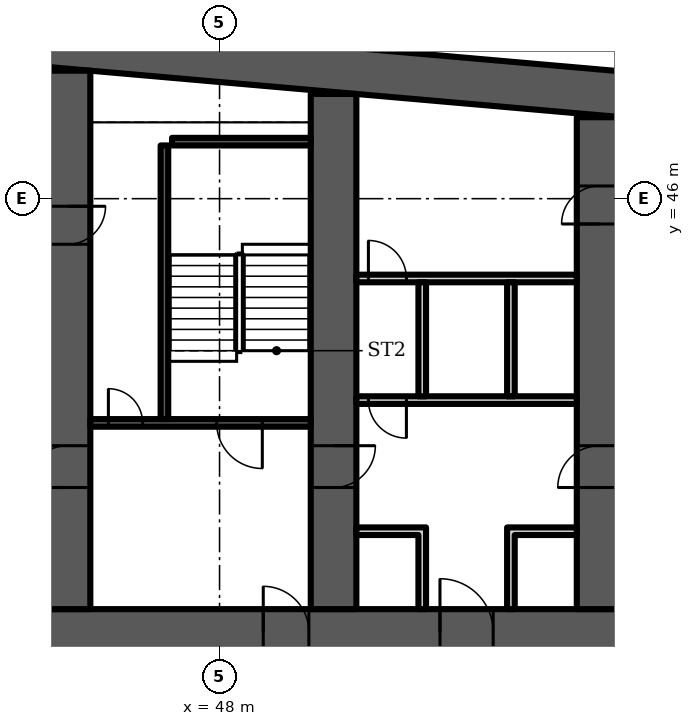
"""IFC4 building model, lengths in metres.
Left out: names, types, materials, properties, quantities, classifications, styles, units other than length and angle.
Written with IfcOpenShell. Run it as: python <this file> out.ifc"""

import sys

from ifc_helpers import new_model, si_unit, direction, frame, frame_2d, origin, place, context, subcontext, project, spatial, polyline, rectangle, outline, extrude, element, fill, save


model = new_model("IFC4")
c1 = context("Model", 3, precision=1e-05, world=origin(), true_north=direction((0.0, 1.0)))
c2 = subcontext(c1, "Body", "Model", "MODEL_VIEW")
j1 = project(units=[si_unit("LENGTHUNIT", "METRE"), si_unit("PLANEANGLEUNIT", "RADIAN")], contexts=[c1])
p1 = place(None, origin())
s1 = spatial("IfcSite", under=j1, at=p1, CompositionType="ELEMENT")
p2 = place(p1, origin())
s2 = spatial("IfcBuilding", under=s1, at=p2, CompositionType="ELEMENT")
p3 = place(p2, frame((0.0, 0.0, 66.7)))
s3 = spatial("IfcBuildingStorey", under=s2, at=p3, CompositionType="ELEMENT", Elevation=66.7)
p4 = place(p3, origin())
e1 = element("IfcWall", 1, at=p4, inside=s3, PredefinedType="SHEAR", context=c2, shape_type="SweptSolid", body=[
    extrude(outline(polyline([(9.0, 47.583), (37.0, 50.032), (65.0, 47.583), (65.0, 48.787), (37.0, 51.237), (9.0, 48.787), (9.0, 47.583)])), origin(), (0.0, 0.0, 1.0), 3.6),
])
p5 = place(p3, frame((9.0, 34.6, 0.0), z_axis=(0.0, 0.0, 1.0), x_axis=(1.0, 0.0, 0.0)))
e2 = element("IfcWall", 2, at=p5, inside=s3, PredefinedType="SHEAR", context=c2, shape_type="SweptSolid", body=[
    extrude(rectangle(XDim=56.0, YDim=1.2, at=frame_2d((28.0, 0.0))), origin(), (0.0, 0.0, 1.0), 3.6),
])
p6 = place(p5, frame((2.0, 0.0, 0.0)))
e3 = element("IfcOpeningElement", 3, at=p6, cuts=e2, PredefinedType="OPENING", context=c2, shape_type="SweptSolid", body=[
    extrude(rectangle(XDim=1.0, YDim=2.1, at=frame_2d((0.5, 1.05))), frame((0.0, 0.61, 0.0), z_axis=(0.0, -1.0, 0.0), x_axis=(1.0, 0.0, 0.0)), (0.0, 0.0, 1.0), 1.22),
])
p7 = place(p5, frame((4.6, 0.0, 0.0)))
e4 = element("IfcOpeningElement", 4, at=p7, cuts=e2, PredefinedType="OPENING", context=c2, shape_type="SweptSolid", body=[
    extrude(rectangle(XDim=1.0, YDim=2.1, at=frame_2d((0.5, 1.05))), frame((0.0, 0.61, 0.0), z_axis=(0.0, -1.0, 0.0), x_axis=(1.0, 0.0, 0.0)), (0.0, 0.0, 1.0), 1.22),
])
p8 = place(p5, frame((7.867, 0.0, 0.0)))
e5 = element("IfcOpeningElement", 5, at=p8, cuts=e2, PredefinedType="OPENING", context=c2, shape_type="SweptSolid", body=[
    extrude(rectangle(XDim=1.1, YDim=2.1, at=frame_2d((0.55, 1.05))), frame((0.0, 0.61, 0.0), z_axis=(0.0, -1.0, 0.0), x_axis=(1.0, 0.0, 0.0)), (0.0, 0.0, 1.0), 1.22),
])
p9 = place(p5, frame((12.033, 0.0, 0.0)))
e6 = element("IfcOpeningElement", 6, at=p9, cuts=e2, PredefinedType="OPENING", context=c2, shape_type="SweptSolid", body=[
    extrude(rectangle(XDim=1.1, YDim=2.1, at=frame_2d((0.55, 1.05))), frame((0.0, 0.61, 0.0), z_axis=(0.0, -1.0, 0.0), x_axis=(1.0, 0.0, 0.0)), (0.0, 0.0, 1.0), 1.22),
])
p10 = place(p5, frame((9.8, 0.0, 0.0)))
e7 = element("IfcOpeningElement", 7, at=p10, cuts=e2, PredefinedType="OPENING", context=c2, shape_type="SweptSolid", body=[
    extrude(rectangle(XDim=1.4, YDim=2.1, at=frame_2d((0.7, 1.05))), frame((0.0, 0.61, 0.0), z_axis=(0.0, -1.0, 0.0), x_axis=(1.0, 0.0, 0.0)), (0.0, 0.0, 1.0), 1.22),
])
p11 = place(p5, frame((14.65, 0.0, 0.0)))
e8 = element("IfcOpeningElement", 8, at=p11, cuts=e2, PredefinedType="OPENING", context=c2, shape_type="SweptSolid", body=[
    extrude(rectangle(XDim=1.2, YDim=2.1, at=frame_2d((0.6, 1.05))), frame((0.0, 0.61, 0.0), z_axis=(0.0, -1.0, 0.0), x_axis=(1.0, 0.0, 0.0)), (0.0, 0.0, 1.0), 1.22),
])
p12 = place(p5, frame((21.867, 0.0, 0.0)))
e9 = element("IfcOpeningElement", 9, at=p12, cuts=e2, PredefinedType="OPENING", context=c2, shape_type="SweptSolid", body=[
    extrude(rectangle(XDim=1.1, YDim=2.1, at=frame_2d((0.55, 1.05))), frame((0.0, 0.61, 0.0), z_axis=(0.0, -1.0, 0.0), x_axis=(1.0, 0.0, 0.0)), (0.0, 0.0, 1.0), 1.22),
])
p13 = place(p5, frame((26.033, 0.0, 0.0)))
e10 = element("IfcOpeningElement", 10, at=p13, cuts=e2, PredefinedType="OPENING", context=c2, shape_type="SweptSolid", body=[
    extrude(rectangle(XDim=1.1, YDim=2.1, at=frame_2d((0.55, 1.05))), frame((0.0, 0.61, 0.0), z_axis=(0.0, -1.0, 0.0), x_axis=(1.0, 0.0, 0.0)), (0.0, 0.0, 1.0), 1.22),
])
p14 = place(p5, frame((23.8, 0.0, 0.0)))
e11 = element("IfcOpeningElement", 11, at=p14, cuts=e2, PredefinedType="OPENING", context=c2, shape_type="SweptSolid", body=[
    extrude(rectangle(XDim=1.4, YDim=2.1, at=frame_2d((0.7, 1.05))), frame((0.0, 0.61, 0.0), z_axis=(0.0, -1.0, 0.0), x_axis=(1.0, 0.0, 0.0)), (0.0, 0.0, 1.0), 1.22),
])
p15 = place(p5, frame((28.867, 0.0, 0.0)))
e12 = element("IfcOpeningElement", 12, at=p15, cuts=e2, PredefinedType="OPENING", context=c2, shape_type="SweptSolid", body=[
    extrude(rectangle(XDim=1.1, YDim=2.1, at=frame_2d((0.55, 1.05))), frame((0.0, 0.61, 0.0), z_axis=(0.0, -1.0, 0.0), x_axis=(1.0, 0.0, 0.0)), (0.0, 0.0, 1.0), 1.22),
])
p16 = place(p5, frame((33.033, 0.0, 0.0)))
e13 = element("IfcOpeningElement", 13, at=p16, cuts=e2, PredefinedType="OPENING", context=c2, shape_type="SweptSolid", body=[
    extrude(rectangle(XDim=1.1, YDim=2.1, at=frame_2d((0.55, 1.05))), frame((0.0, 0.61, 0.0), z_axis=(0.0, -1.0, 0.0), x_axis=(1.0, 0.0, 0.0)), (0.0, 0.0, 1.0), 1.22),
])
p17 = place(p5, frame((40.15, 0.0, 0.0)))
e14 = element("IfcOpeningElement", 14, at=p17, cuts=e2, PredefinedType="OPENING", context=c2, shape_type="SweptSolid", body=[
    extrude(rectangle(XDim=1.2, YDim=2.1, at=frame_2d((0.6, 1.05))), frame((0.0, 0.61, 0.0), z_axis=(0.0, -1.0, 0.0), x_axis=(1.0, 0.0, 0.0)), (0.0, 0.0, 1.0), 1.22),
])
p18 = place(p5, frame((44.8, 0.0, 0.0)))
e15 = element("IfcOpeningElement", 15, at=p18, cuts=e2, PredefinedType="OPENING", context=c2, shape_type="SweptSolid", body=[
    extrude(rectangle(XDim=1.4, YDim=2.1, at=frame_2d((0.7, 1.05))), frame((0.0, 0.61, 0.0), z_axis=(0.0, -1.0, 0.0), x_axis=(1.0, 0.0, 0.0)), (0.0, 0.0, 1.0), 1.22),
])
p19 = place(p5, frame((49.867, 0.0, 0.0)))
e16 = element("IfcOpeningElement", 16, at=p19, cuts=e2, PredefinedType="OPENING", context=c2, shape_type="SweptSolid", body=[
    extrude(rectangle(XDim=1.1, YDim=2.1, at=frame_2d((0.55, 1.05))), frame((0.0, 0.61, 0.0), z_axis=(0.0, -1.0, 0.0), x_axis=(1.0, 0.0, 0.0)), (0.0, 0.0, 1.0), 1.22),
])
p20 = place(p5, frame((53.5, 0.0, 0.0)))
e17 = element("IfcOpeningElement", 17, at=p20, cuts=e2, PredefinedType="OPENING", context=c2, shape_type="SweptSolid", body=[
    extrude(rectangle(XDim=1.1, YDim=2.1, at=frame_2d((0.55, 1.05))), frame((0.0, 0.61, 0.0), z_axis=(0.0, -1.0, 0.0), x_axis=(1.0, 0.0, 0.0)), (0.0, 0.0, 1.0), 1.22),
])
p21 = place(p5, frame((51.567, 0.0, 0.0)))
e18 = element("IfcOpeningElement", 18, at=p21, cuts=e2, PredefinedType="OPENING", context=c2, shape_type="SweptSolid", body=[
    extrude(rectangle(XDim=1.4, YDim=2.1, at=frame_2d((0.7, 1.05))), frame((0.0, 0.61, 0.0), z_axis=(0.0, -1.0, 0.0), x_axis=(1.0, 0.0, 0.0)), (0.0, 0.0, 1.0), 1.22),
])
p22 = place(p3, frame((44.0, 35.2, 0.0), z_axis=(0.0, 0.0, 1.0), x_axis=(0.0, 1.0, 0.0)))
e19 = element("IfcWall", 19, at=p22, inside=s3, PredefinedType="SHEAR", context=c2, shape_type="SweptSolid", body=[
    extrude(rectangle(XDim=14.168, YDim=1.2, at=frame_2d((7.084, 0.0))), origin(), (0.0, 0.0, 1.0), 3.6),
])
p23 = place(p22, frame((3.2, 0.0, 0.0)))
e20 = element("IfcOpeningElement", 20, at=p23, cuts=e19, PredefinedType="OPENING", context=c2, shape_type="SweptSolid", body=[
    extrude(rectangle(XDim=1.1, YDim=2.1, at=frame_2d((0.55, 1.05))), frame((0.0, 0.61, 0.0), z_axis=(0.0, -1.0, 0.0), x_axis=(1.0, 0.0, 0.0)), (0.0, 0.0, 1.0), 1.22),
])
p24 = place(p22, frame((9.6, 0.0, 0.0)))
e21 = element("IfcOpeningElement", 21, at=p24, cuts=e19, PredefinedType="OPENING", context=c2, shape_type="SweptSolid", body=[
    extrude(rectangle(XDim=1.0, YDim=2.1, at=frame_2d((0.5, 1.05))), frame((0.0, 0.61, 0.0), z_axis=(0.0, -1.0, 0.0), x_axis=(1.0, 0.0, 0.0)), (0.0, 0.0, 1.0), 1.22),
])
p25 = place(p3, frame((51.0, 35.2, 0.0), z_axis=(0.0, 0.0, 1.0), x_axis=(0.0, 1.0, 0.0)))
e22 = element("IfcWall", 22, at=p25, inside=s3, PredefinedType="SHEAR", context=c2, shape_type="SweptSolid", body=[
    extrude(rectangle(XDim=13.555, YDim=1.2, at=frame_2d((6.778, 0.0))), origin(), (0.0, 0.0, 1.0), 3.6),
])
p26 = place(p25, frame((3.2, 0.0, 0.0)))
e23 = element("IfcOpeningElement", 23, at=p26, cuts=e22, PredefinedType="OPENING", context=c2, shape_type="SweptSolid", body=[
    extrude(rectangle(XDim=1.1, YDim=2.1, at=frame_2d((0.55, 1.05))), frame((0.0, 0.61, 0.0), z_axis=(0.0, -1.0, 0.0), x_axis=(1.0, 0.0, 0.0)), (0.0, 0.0, 1.0), 1.22),
])
p27 = place(p3, frame((58.0, 35.2, 0.0), z_axis=(0.0, 0.0, 1.0), x_axis=(0.0, 1.0, 0.0)))
e24 = element("IfcWall", 24, at=p27, inside=s3, PredefinedType="SHEAR", context=c2, shape_type="SweptSolid", body=[
    extrude(rectangle(XDim=12.943, YDim=1.2, at=frame_2d((6.471, 0.0))), origin(), (0.0, 0.0, 1.0), 3.6),
])
p28 = place(p27, frame((10.134, 0.0, 0.0)))
e25 = element("IfcOpeningElement", 25, at=p28, cuts=e24, PredefinedType="OPENING", context=c2, shape_type="SweptSolid", body=[
    extrude(rectangle(XDim=1.0, YDim=2.1, at=frame_2d((0.5, 1.05))), frame((0.0, 0.61, 0.0), z_axis=(0.0, -1.0, 0.0), x_axis=(1.0, 0.0, 0.0)), (0.0, 0.0, 1.0), 1.22),
])
p29 = place(p27, frame((3.2, 0.0, 0.0)))
e26 = element("IfcOpeningElement", 26, at=p29, cuts=e24, PredefinedType="OPENING", context=c2, shape_type="SweptSolid", body=[
    extrude(rectangle(XDim=1.1, YDim=2.1, at=frame_2d((0.55, 1.05))), frame((0.0, 0.61, 0.0), z_axis=(0.0, -1.0, 0.0), x_axis=(1.0, 0.0, 0.0)), (0.0, 0.0, 1.0), 1.22),
])
p30 = place(p3, frame((44.6, 40.1, 0.0), z_axis=(0.0, 0.0, 1.0), x_axis=(1.0, 0.0, 0.0)))
e27 = element("IfcWall", 27, at=p30, inside=s3, PredefinedType="SHEAR", context=c2, shape_type="SweptSolid", body=[
    extrude(rectangle(XDim=5.8, YDim=0.2, at=frame_2d((2.9, 0.0))), origin(), (0.0, 0.0, 1.0), 3.2),
])
p31 = place(p30, frame((3.325, 0.0, 0.0)))
e28 = element("IfcOpeningElement", 28, at=p31, cuts=e27, PredefinedType="OPENING", context=c2, shape_type="SweptSolid", body=[
    extrude(rectangle(XDim=1.2, YDim=2.1, at=frame_2d((0.6, 1.05))), frame((0.0, 0.11, 0.0), z_axis=(0.0, -1.0, 0.0), x_axis=(1.0, 0.0, 0.0)), (0.0, 0.0, 1.0), 0.22),
])
p32 = place(p30, frame((0.475, 0.0, 0.0)))
e29 = element("IfcOpeningElement", 29, at=p32, cuts=e27, PredefinedType="OPENING", context=c2, shape_type="SweptSolid", body=[
    extrude(rectangle(XDim=0.9, YDim=2.1, at=frame_2d((0.45, 1.05))), frame((0.0, 0.11, 0.0), z_axis=(0.0, -1.0, 0.0), x_axis=(1.0, 0.0, 0.0)), (0.0, 0.0, 1.0), 0.22),
])
p33 = place(p3, frame((46.55, 40.2, 0.0), z_axis=(0.0, 0.0, 1.0), x_axis=(0.0, 1.0, 0.0)))
e30 = element("IfcWall", 30, at=p33, inside=s3, PredefinedType="SHEAR", context=c2, shape_type="SweptSolid", body=[
    extrude(rectangle(XDim=7.2, YDim=0.2, at=frame_2d((3.6, 0.0))), origin(), (0.0, 0.0, 1.0), 3.2),
])
p34 = place(p3, frame((46.75, 47.5, 0.0), z_axis=(0.0, 0.0, 1.0), x_axis=(1.0, 0.0, 0.0)))
e31 = element("IfcWall", 31, at=p34, inside=s3, PredefinedType="SHEAR", context=c2, shape_type="SweptSolid", body=[
    extrude(rectangle(XDim=3.65, YDim=0.2, at=frame_2d((1.825, 0.0))), origin(), (0.0, 0.0, 1.0), 3.2),
])
p35 = place(p3, frame((51.6, 40.7, 0.0), z_axis=(0.0, 0.0, 1.0), x_axis=(1.0, 0.0, 0.0)))
e32 = element("IfcWall", 32, at=p35, inside=s3, PredefinedType="PARTITIONING", context=c2, shape_type="SweptSolid", body=[
    extrude(rectangle(XDim=5.8, YDim=0.2, at=frame_2d((2.9, 0.0))), origin(), (0.0, 0.0, 1.0), 3.2),
])
p36 = place(p35, frame((0.317, 0.0, 0.0)))
e33 = element("IfcOpeningElement", 33, at=p36, cuts=e32, PredefinedType="OPENING", context=c2, shape_type="SweptSolid", body=[
    extrude(rectangle(XDim=1.0, YDim=2.1, at=frame_2d((0.5, 1.05))), frame((0.0, 0.11, 0.0), z_axis=(0.0, -1.0, 0.0), x_axis=(1.0, 0.0, 0.0)), (0.0, 0.0, 1.0), 0.22),
])
p37 = place(p3, frame((51.6, 43.9, 0.0), z_axis=(0.0, 0.0, 1.0), x_axis=(1.0, 0.0, 0.0)))
e34 = element("IfcWall", 34, at=p37, inside=s3, PredefinedType="PARTITIONING", context=c2, shape_type="SweptSolid", body=[
    extrude(rectangle(XDim=5.8, YDim=0.2, at=frame_2d((2.9, 0.0))), origin(), (0.0, 0.0, 1.0), 3.2),
])
p38 = place(p37, frame((0.317, 0.0, 0.0)))
e35 = element("IfcOpeningElement", 35, at=p38, cuts=e34, PredefinedType="OPENING", context=c2, shape_type="SweptSolid", body=[
    extrude(rectangle(XDim=1.0, YDim=2.1, at=frame_2d((0.5, 1.05))), frame((0.0, 0.11, 0.0), z_axis=(0.0, -1.0, 0.0), x_axis=(1.0, 0.0, 0.0)), (0.0, 0.0, 1.0), 0.22),
])
p39 = place(p3, frame((0.0, 0.0, -0.0)))
e36 = element("IfcWall", 36, at=p39, inside=s3, PredefinedType="PARTITIONING", context=c2, shape_type="SweptSolid", body=[
    extrude(outline(polyline([(53.233, 37.15), (51.6, 37.15), (51.6, 37.35), (53.233, 37.35), (53.433, 37.35), (53.433, 35.2), (53.233, 35.2), (53.233, 37.15)])), origin(), (0.0, 0.0, 1.0), 3.2),
])
p40 = place(p3, frame((0.0, 0.0, -0.0)))
e37 = element("IfcWall", 37, at=p40, inside=s3, PredefinedType="PARTITIONING", context=c2, shape_type="SweptSolid", body=[
    extrude(outline(polyline([(55.567, 37.35), (55.767, 37.35), (57.4, 37.35), (57.4, 37.15), (55.767, 37.15), (55.767, 35.2), (55.567, 35.2), (55.567, 37.35)])), origin(), (0.0, 0.0, 1.0), 3.2),
])
p41 = place(p3, frame((0.0, 0.0, -0.0)))
e38 = element("IfcWall", 38, at=p41, inside=s3, PredefinedType="PARTITIONING", context=c2, shape_type="SweptSolid", body=[
    extrude(outline(polyline([(53.233, 40.8), (53.233, 43.8), (53.433, 43.8), (53.433, 40.8), (53.233, 40.8)])), origin(), (0.0, 0.0, 1.0), 3.2),
])
p42 = place(p3, frame((0.0, 0.0, -0.0)))
e39 = element("IfcWall", 39, at=p42, inside=s3, PredefinedType="PARTITIONING", context=c2, shape_type="SweptSolid", body=[
    extrude(outline(polyline([(55.567, 40.8), (55.567, 43.8), (55.767, 43.8), (55.767, 40.8), (55.567, 40.8)])), origin(), (0.0, 0.0, 1.0), 3.2),
])
p43 = place(p31, origin())
e40 = element("IfcDoor", 40, at=p43, inside=s3, OperationType="SINGLE_SWING_RIGHT", PredefinedType="DOOR", context=c2, shape_type="SweptSolid", body=[
    extrude(rectangle(XDim=1.2, YDim=2.1, at=frame_2d((0.6, 1.05))), frame((0.0, 0.025, 0.0), z_axis=(0.0, -1.0, 0.0), x_axis=(1.0, 0.0, 0.0)), (0.0, 0.0, 1.0), 0.05),
])
fill(e28, e40)
p44 = place(p32, origin())
e41 = element("IfcDoor", 41, at=p44, inside=s3, OperationType="SINGLE_SWING_LEFT", PredefinedType="DOOR", context=c2, shape_type="SweptSolid", body=[
    extrude(rectangle(XDim=0.9, YDim=2.1, at=frame_2d((0.45, 1.05))), frame((0.0, 0.025, 0.0), z_axis=(0.0, -1.0, 0.0), x_axis=(1.0, 0.0, 0.0)), (0.0, 0.0, 1.0), 0.05),
])
fill(e29, e41)
p45 = place(p17, origin())
e42 = element("IfcDoor", 42, at=p45, inside=s3, OperationType="SINGLE_SWING_LEFT", PredefinedType="DOOR", context=c2, shape_type="SweptSolid", body=[
    extrude(rectangle(XDim=1.2, YDim=2.1, at=frame_2d((0.6, 1.05))), frame((0.0, 0.025, 0.0), z_axis=(0.0, -1.0, 0.0), x_axis=(1.0, 0.0, 0.0)), (0.0, 0.0, 1.0), 0.05),
])
fill(e14, e42)
p46 = place(p18, origin())
e43 = element("IfcDoor", 43, at=p46, inside=s3, OperationType="DOUBLE_DOOR_SINGLE_SWING", PredefinedType="DOOR", context=c2, shape_type="SweptSolid", body=[
    extrude(rectangle(XDim=1.4, YDim=2.1, at=frame_2d((0.7, 1.05))), frame((0.0, 0.025, 0.0), z_axis=(0.0, -1.0, 0.0), x_axis=(1.0, 0.0, 0.0)), (0.0, 0.0, 1.0), 0.05),
])
fill(e15, e43)
p47 = place(p36, origin())
e44 = element("IfcDoor", 44, at=p47, inside=s3, OperationType="SINGLE_SWING_RIGHT", PredefinedType="DOOR", context=c2, shape_type="SweptSolid", body=[
    extrude(rectangle(XDim=1.0, YDim=2.1, at=frame_2d((0.5, 1.05))), frame((0.0, 0.025, 0.0), z_axis=(0.0, -1.0, 0.0), x_axis=(1.0, 0.0, 0.0)), (0.0, 0.0, 1.0), 0.05),
])
fill(e33, e44)
p48 = place(p38, origin())
e45 = element("IfcDoor", 45, at=p48, inside=s3, OperationType="SINGLE_SWING_LEFT", PredefinedType="DOOR", context=c2, shape_type="SweptSolid", body=[
    extrude(rectangle(XDim=1.0, YDim=2.1, at=frame_2d((0.5, 1.05))), frame((0.0, 0.025, 0.0), z_axis=(0.0, -1.0, 0.0), x_axis=(1.0, 0.0, 0.0)), (0.0, 0.0, 1.0), 0.05),
])
fill(e35, e45)
p49 = place(p28, origin())
e46 = element("IfcDoor", 46, at=p49, inside=s3, OperationType="SINGLE_SWING_LEFT", PredefinedType="DOOR", context=c2, shape_type="SweptSolid", body=[
    extrude(rectangle(XDim=1.0, YDim=2.1, at=frame_2d((0.5, 1.05))), frame((0.0, 0.6, 0.0), z_axis=(0.0, -1.0, 0.0), x_axis=(1.0, 0.0, 0.0)), (0.0, 0.0, 1.0), 1.199),
])
fill(e25, e46)
p50 = place(p23, origin())
e47 = element("IfcDoor", 47, at=p50, inside=s3, OperationType="SINGLE_SWING_LEFT", PredefinedType="DOOR", context=c2, shape_type="SweptSolid", body=[
    extrude(rectangle(XDim=1.1, YDim=2.1, at=frame_2d((0.55, 1.05))), frame((0.0, 0.025, 0.0), z_axis=(0.0, -1.0, 0.0), x_axis=(1.0, 0.0, 0.0)), (0.0, 0.0, 1.0), 0.05),
])
fill(e20, e47)
p51 = place(p24, origin())
e48 = element("IfcDoor", 48, at=p51, inside=s3, OperationType="SINGLE_SWING_RIGHT", PredefinedType="DOOR", context=c2, shape_type="SweptSolid", body=[
    extrude(rectangle(XDim=1.0, YDim=2.1, at=frame_2d((0.5, 1.05))), frame((0.0, 0.6, 0.0), z_axis=(0.0, -1.0, 0.0), x_axis=(1.0, 0.0, 0.0)), (0.0, 0.0, 1.0), 1.199),
])
fill(e21, e48)
p52 = place(p26, origin())
e49 = element("IfcDoor", 49, at=p52, inside=s3, OperationType="SINGLE_SWING_RIGHT", PredefinedType="DOOR", context=c2, shape_type="SweptSolid", body=[
    extrude(rectangle(XDim=1.1, YDim=2.1, at=frame_2d((0.55, 1.05))), frame((0.0, 0.025, 0.0), z_axis=(0.0, -1.0, 0.0), x_axis=(1.0, 0.0, 0.0)), (0.0, 0.0, 1.0), 0.05),
])
fill(e23, e49)
p53 = place(p29, origin())
e50 = element("IfcDoor", 50, at=p53, inside=s3, OperationType="SINGLE_SWING_LEFT", PredefinedType="DOOR", context=c2, shape_type="SweptSolid", body=[
    extrude(rectangle(XDim=1.1, YDim=2.1, at=frame_2d((0.55, 1.05))), frame((0.0, 0.025, 0.0), z_axis=(0.0, -1.0, 0.0), x_axis=(1.0, 0.0, 0.0)), (0.0, 0.0, 1.0), 0.05),
])
fill(e26, e50)
save(model, sys.argv[1])
